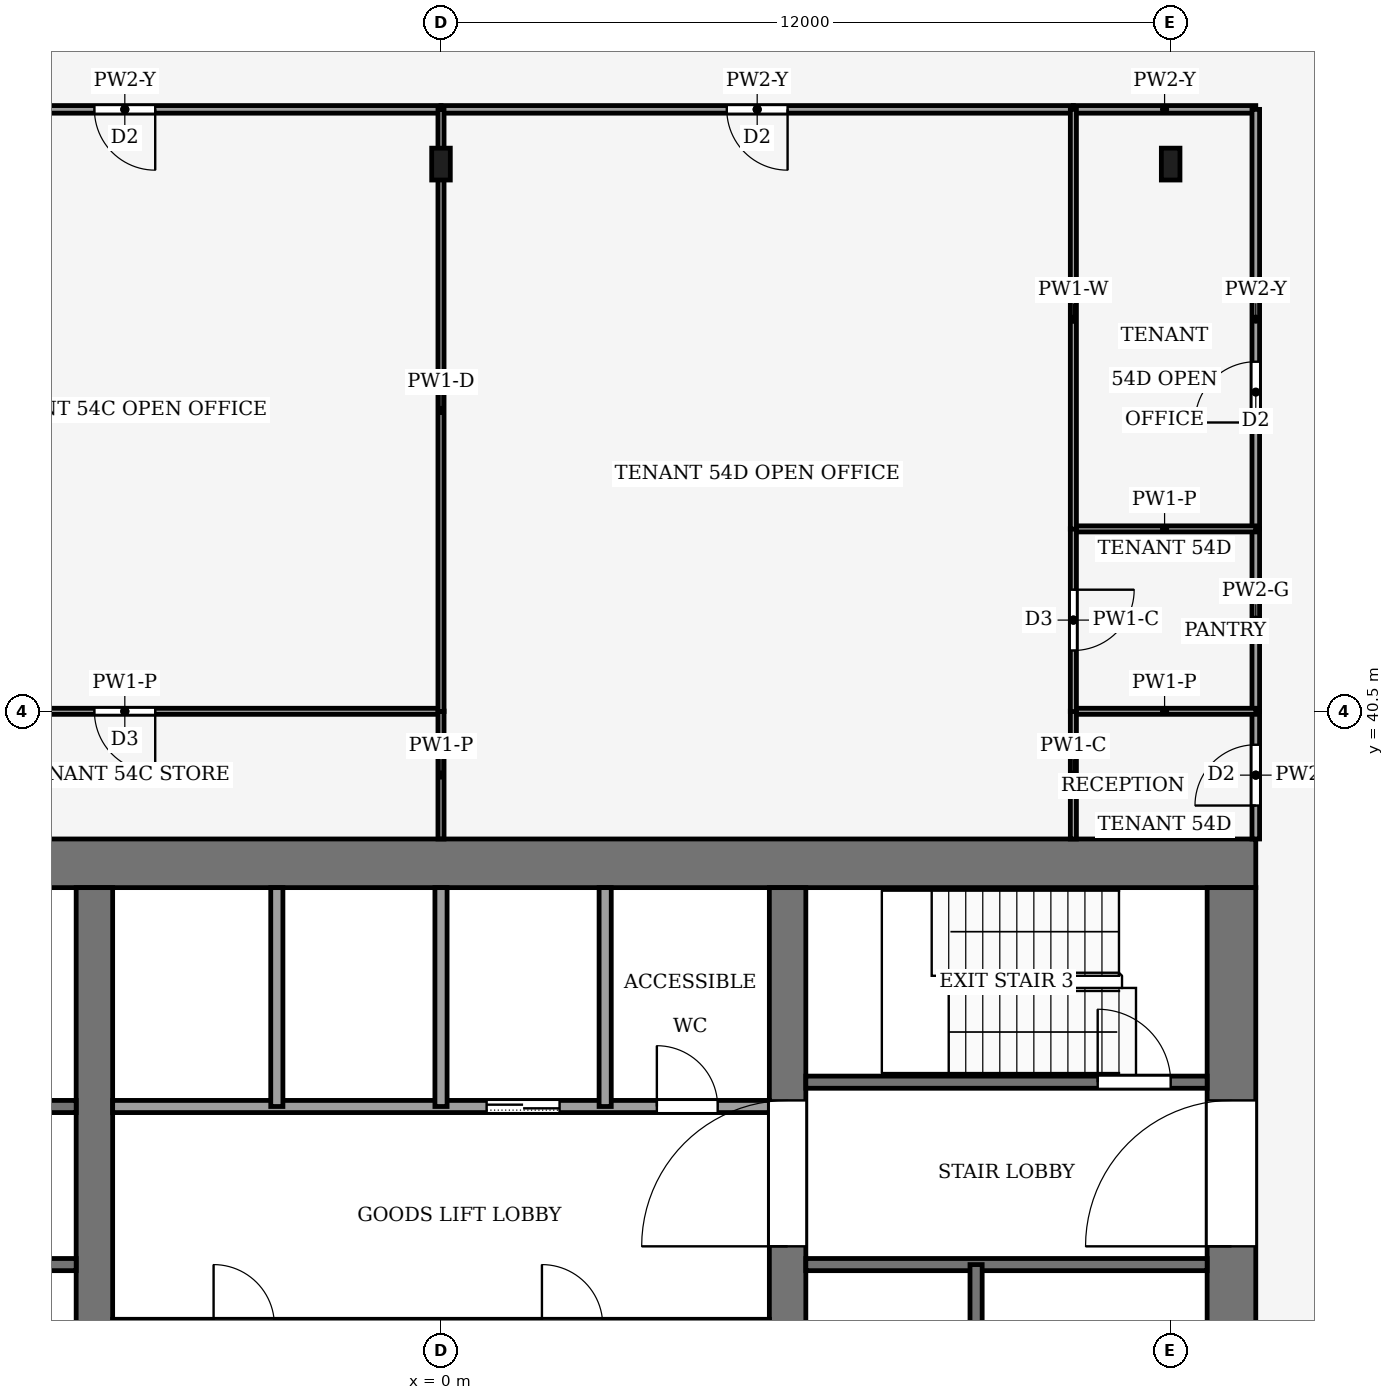
"""IFC4 building model, lengths in metres.
Left out: names, types, materials, properties, quantities, classifications, styles, units other than length and angle.
Written with IfcOpenShell. Run it as: python <this file> out.ifc"""

import sys

from ifc_helpers import new_model, si_unit, direction, frame, frame_2d, origin, origin_2d, place, context, subcontext, project, spatial, rectangle, i_section, extrude, element, fill, save


model = new_model("IFC4")
c1 = context("Model", 3, precision=1e-05, world=origin(), true_north=direction((0.0, 1.0)))
c2 = subcontext(c1, "Body", "Model", "MODEL_VIEW")
j1 = project(units=[si_unit("LENGTHUNIT", "METRE"), si_unit("PLANEANGLEUNIT", "RADIAN")], contexts=[c1])
p1 = place(None, origin())
s1 = spatial("IfcSite", under=j1, at=p1, CompositionType="ELEMENT")
p2 = place(p1, origin())
s2 = spatial("IfcBuilding", under=s1, at=p2, CompositionType="ELEMENT")
p3 = place(p2, frame((0.0, 0.0, 238.0)))
s3 = spatial("IfcBuildingStorey", under=s2, at=p3, CompositionType="ELEMENT", Elevation=238.0)
p4 = place(p3, frame((-13.4, 38.0, -0.13), z_axis=(0.0, 0.0, 1.0), x_axis=(1.0, 0.0, 0.0)))
e1 = element("IfcWall", 1, at=p4, inside=s3, PredefinedType="SHEAR", context=c2, shape_type="SweptSolid", body=[
    extrude(rectangle(XDim=26.8, YDim=0.8, at=frame_2d((13.4, 0.0))), origin(), (0.0, 0.0, 1.0), 4.0),
])
p5 = place(p3, frame((13.0, 18.4, -0.13), z_axis=(0.0, 0.0, 1.0), x_axis=(0.0, 1.0, 0.0)))
e2 = element("IfcWall", 2, at=p5, inside=s3, PredefinedType="SHEAR", context=c2, shape_type="SweptSolid", body=[
    extrude(rectangle(XDim=19.2, YDim=0.8, at=frame_2d((9.6, 0.0))), origin(), (0.0, 0.0, 1.0), 4.0),
])
p6 = place(p5, frame((2.8, 0.0, 0.13)))
e3 = element("IfcOpeningElement", 3, at=p6, cuts=e2, PredefinedType="OPENING", context=c2, shape_type="SweptSolid", body=[
    extrude(rectangle(XDim=2.4, YDim=2.4, at=frame_2d((1.2, 1.2))), frame((0.0, 0.41, 0.0), z_axis=(0.0, -1.0, 0.0), x_axis=(1.0, 0.0, 0.0)), (0.0, 0.0, 1.0), 0.82),
])
p7 = place(p5, frame((13.3, 0.0, 0.13)))
e4 = element("IfcOpeningElement", 4, at=p7, cuts=e2, PredefinedType="OPENING", context=c2, shape_type="SweptSolid", body=[
    extrude(rectangle(XDim=2.4, YDim=2.4, at=frame_2d((1.2, 1.2))), frame((0.0, 0.41, 0.0), z_axis=(0.0, -1.0, 0.0), x_axis=(1.0, 0.0, 0.0)), (0.0, 0.0, 1.0), 0.82),
])
p8 = place(p3, frame((-5.7, 18.4, -0.13), z_axis=(0.0, 0.0, 1.0), x_axis=(0.0, 1.0, 0.0)))
e5 = element("IfcWall", 5, at=p8, inside=s3, PredefinedType="SHEAR", context=c2, shape_type="SweptSolid", body=[
    extrude(rectangle(XDim=19.2, YDim=0.6, at=frame_2d((9.6, 0.0))), origin(), (0.0, 0.0, 1.0), 4.0),
])
p9 = place(p8, frame((8.35, 0.0, 0.13)))
e6 = element("IfcOpeningElement", 6, at=p9, cuts=e5, PredefinedType="OPENING", context=c2, shape_type="SweptSolid", body=[
    extrude(rectangle(XDim=0.9, YDim=2.1, at=frame_2d((0.45, 1.05))), frame((0.0, 0.31, 0.0), z_axis=(0.0, -1.0, 0.0), x_axis=(1.0, 0.0, 0.0)), (0.0, 0.0, 1.0), 0.62),
])
p10 = place(p3, frame((5.7, 18.4, -0.13), z_axis=(0.0, 0.0, 1.0), x_axis=(0.0, 1.0, 0.0)))
e7 = element("IfcWall", 7, at=p10, inside=s3, PredefinedType="SHEAR", context=c2, shape_type="SweptSolid", body=[
    extrude(rectangle(XDim=19.2, YDim=0.6, at=frame_2d((9.6, 0.0))), origin(), (0.0, 0.0, 1.0), 4.0),
])
p11 = place(p10, frame((13.3, 0.0, 0.13)))
e8 = element("IfcOpeningElement", 8, at=p11, cuts=e7, PredefinedType="OPENING", context=c2, shape_type="SweptSolid", body=[
    extrude(rectangle(XDim=2.4, YDim=2.4, at=frame_2d((1.2, 1.2))), frame((0.0, 0.31, 0.0), z_axis=(0.0, -1.0, 0.0), x_axis=(1.0, 0.0, 0.0)), (0.0, 0.0, 1.0), 0.62),
])
for number, where, z_axis, x_axis in (
    (9, (0.0, 49.5, 0.0), (0.0, 0.0, 1.0), (1.0, 0.0, 0.0)),
    (10, (12.0, 49.5, 0.0), (0.0, 0.0, 1.0), (1.0, 0.0, 0.0)),
):
    element("IfcColumn", number, at=place(p3, frame(where, z_axis=z_axis, x_axis=x_axis)), inside=s3, PredefinedType="COLUMN", context=c2, shape_type="SweptSolid", body=[
        extrude(i_section(OverallWidth=0.306, OverallDepth=0.524, WebThickness=0.012, FlangeThickness=0.04, FilletRadius=0.027, at=origin_2d()), origin(), (0.0, 0.0, 1.0), 4.0),
    ])
p12 = place(p3, frame((-12.6, 31.4, 0.0), z_axis=(0.0, 0.0, 1.0), x_axis=(1.0, 0.0, 0.0)))
e11 = element("IfcWall", 11, at=p12, inside=s3, PredefinedType="PARTITIONING", context=c2, shape_type="SweptSolid", body=[
    extrude(rectangle(XDim=6.6, YDim=0.2, at=frame_2d((3.3, 0.0))), origin(), (0.0, 0.0, 1.0), 3.87),
])
p13 = place(p12, frame((1.0, 0.0, 0.0)))
e12 = element("IfcOpeningElement", 12, at=p13, cuts=e11, PredefinedType="OPENING", context=c2, shape_type="SweptSolid", body=[
    extrude(rectangle(XDim=1.2, YDim=2.2, at=frame_2d((0.6, 1.1))), frame((0.0, 0.11, 0.0), z_axis=(0.0, -1.0, 0.0), x_axis=(1.0, 0.0, 0.0)), (0.0, 0.0, 1.0), 0.22),
])
p14 = place(p3, frame((6.0, 31.4, 0.0), z_axis=(0.0, 0.0, 1.0), x_axis=(1.0, 0.0, 0.0)))
e13 = element("IfcWall", 13, at=p14, inside=s3, PredefinedType="PARTITIONING", context=c2, shape_type="SweptSolid", body=[
    extrude(rectangle(XDim=6.6, YDim=0.2, at=frame_2d((3.3, 0.0))), origin(), (0.0, 0.0, 1.0), 3.87),
])
p15 = place(p3, frame((-12.6, 34.0, 0.0), z_axis=(0.0, 0.0, 1.0), x_axis=(1.0, 0.0, 0.0)))
e14 = element("IfcWall", 14, at=p15, inside=s3, PredefinedType="PARTITIONING", context=c2, shape_type="SweptSolid", body=[
    extrude(rectangle(XDim=6.6, YDim=0.2, at=frame_2d((3.3, 0.0))), origin(), (0.0, 0.0, 1.0), 3.87),
])
p16 = place(p15, frame((4.7, 0.0, 0.0)))
e15 = element("IfcOpeningElement", 15, at=p16, cuts=e14, PredefinedType="OPENING", context=c2, shape_type="SweptSolid", body=[
    extrude(rectangle(XDim=1.4, YDim=2.2, at=frame_2d((0.7, 1.1))), frame((0.0, 0.11, 0.0), z_axis=(0.0, -1.0, 0.0), x_axis=(1.0, 0.0, 0.0)), (0.0, 0.0, 1.0), 0.22),
])
p17 = place(p15, frame((2.3, 0.0, 0.0)))
e16 = element("IfcOpeningElement", 16, at=p17, cuts=e14, PredefinedType="OPENING", context=c2, shape_type="SweptSolid", body=[
    extrude(rectangle(XDim=1.4, YDim=2.2, at=frame_2d((0.7, 1.1))), frame((0.0, 0.11, 0.0), z_axis=(0.0, -1.0, 0.0), x_axis=(1.0, 0.0, 0.0)), (0.0, 0.0, 1.0), 0.22),
])
p18 = place(p15, frame((0.45, 0.0, 0.0)))
e17 = element("IfcOpeningElement", 17, at=p18, cuts=e14, PredefinedType="OPENING", context=c2, shape_type="SweptSolid", body=[
    extrude(rectangle(XDim=0.9, YDim=2.1, at=frame_2d((0.45, 1.05))), frame((0.0, 0.11, 0.0), z_axis=(0.0, -1.0, 0.0), x_axis=(1.0, 0.0, 0.0)), (0.0, 0.0, 1.0), 0.22),
])
p19 = place(p3, frame((-5.4, 34.0, 0.0), z_axis=(0.0, 0.0, 1.0), x_axis=(1.0, 0.0, 0.0)))
e18 = element("IfcWall", 18, at=p19, inside=s3, PredefinedType="PARTITIONING", context=c2, shape_type="SweptSolid", body=[
    extrude(rectangle(XDim=10.8, YDim=0.2, at=frame_2d((5.4, 0.0))), origin(), (0.0, 0.0, 1.0), 3.87),
])
p20 = place(p19, frame((6.15, 0.0, 0.0)))
e19 = element("IfcOpeningElement", 19, at=p20, cuts=e18, PredefinedType="OPENING", context=c2, shape_type="SweptSolid", body=[
    extrude(rectangle(XDim=1.2, YDim=2.2, at=frame_2d((0.6, 1.1))), frame((0.0, 0.11, 0.0), z_axis=(0.0, -1.0, 0.0), x_axis=(1.0, 0.0, 0.0)), (0.0, 0.0, 1.0), 0.22),
])
p21 = place(p19, frame((8.95, 0.0, 0.0)))
e20 = element("IfcOpeningElement", 20, at=p21, cuts=e18, PredefinedType="OPENING", context=c2, shape_type="SweptSolid", body=[
    extrude(rectangle(XDim=1.0, YDim=2.1, at=frame_2d((0.5, 1.05))), frame((0.0, 0.11, 0.0), z_axis=(0.0, -1.0, 0.0), x_axis=(1.0, 0.0, 0.0)), (0.0, 0.0, 1.0), 0.22),
])
p22 = place(p3, frame((6.0, 34.4, 0.0), z_axis=(0.0, 0.0, 1.0), x_axis=(1.0, 0.0, 0.0)))
e21 = element("IfcWall", 21, at=p22, inside=s3, PredefinedType="PARTITIONING", context=c2, shape_type="SweptSolid", body=[
    extrude(rectangle(XDim=6.6, YDim=0.2, at=frame_2d((3.3, 0.0))), origin(), (0.0, 0.0, 1.0), 3.87),
])
p23 = place(p22, frame((4.8, 0.0, 0.0)))
e22 = element("IfcOpeningElement", 22, at=p23, cuts=e21, PredefinedType="OPENING", context=c2, shape_type="SweptSolid", body=[
    extrude(rectangle(XDim=1.2, YDim=2.2, at=frame_2d((0.6, 1.1))), frame((0.0, 0.11, 0.0), z_axis=(0.0, -1.0, 0.0), x_axis=(1.0, 0.0, 0.0)), (0.0, 0.0, 1.0), 0.22),
])
for number, where, z_axis, x_axis in (
    (23, (-2.7, 34.0, 0.0), (0.0, 0.0, 1.0), (0.0, 1.0, 0.0)),
    (24, (0.0, 34.0, 0.0), (0.0, 0.0, 1.0), (0.0, 1.0, 0.0)),
    (25, (2.7, 34.0, 0.0), (0.0, 0.0, 1.0), (0.0, 1.0, 0.0)),
):
    element("IfcWall", number, at=place(p3, frame(where, z_axis=z_axis, x_axis=x_axis)), inside=s3, PredefinedType="PARTITIONING", context=c2, shape_type="SweptSolid", body=[
        extrude(rectangle(XDim=3.6, YDim=0.2, at=frame_2d((1.8, 0.0))), origin(), (0.0, 0.0, 1.0), 3.87),
    ])
p24 = place(p3, frame((8.8, 24.0, 0.0), z_axis=(0.0, 0.0, 1.0), x_axis=(0.0, 1.0, 0.0)))
e26 = element("IfcWall", 26, at=p24, inside=s3, PredefinedType="PARTITIONING", context=c2, shape_type="SweptSolid", body=[
    extrude(rectangle(XDim=7.4, YDim=0.2, at=frame_2d((3.7, 0.0))), origin(), (0.0, 0.0, 1.0), 3.87),
])
p25 = place(p3, frame((0.0, 50.4, 0.0), z_axis=(0.0, 0.0, 1.0), x_axis=(-1.0, 0.0, 0.0)))
e27 = element("IfcWall", 27, at=p25, inside=s3, PredefinedType="PARTITIONING", context=c2, shape_type="SweptSolid", body=[
    extrude(rectangle(XDim=10.4, YDim=0.125, at=frame_2d((5.2, 0.0))), origin(), (0.0, 0.0, 1.0), 3.24),
])
p26 = place(p25, frame((4.7, 0.0, 0.0)))
e28 = element("IfcOpeningElement", 28, at=p26, cuts=e27, PredefinedType="OPENING", context=c2, shape_type="SweptSolid", body=[
    extrude(rectangle(XDim=1.0, YDim=2.1, at=frame_2d((0.5, 1.05))), frame((0.0, 0.073, 0.0), z_axis=(0.0, -1.0, 0.0), x_axis=(1.0, 0.0, 0.0)), (0.0, 0.0, 1.0), 0.145),
])
p27 = place(p3, frame((13.4, 38.4, 0.0), z_axis=(0.0, 0.0, 1.0), x_axis=(0.0, 1.0, 0.0)))
e29 = element("IfcWall", 29, at=p27, inside=s3, PredefinedType="PARTITIONING", context=c2, shape_type="SweptSolid", body=[
    extrude(rectangle(XDim=2.1, YDim=0.125, at=frame_2d((1.05, 0.0))), origin(), (0.0, 0.0, 1.0), 3.14),
])
p28 = place(p27, frame((0.55, 0.0, 0.0)))
e30 = element("IfcOpeningElement", 30, at=p28, cuts=e29, PredefinedType="OPENING", context=c2, shape_type="SweptSolid", body=[
    extrude(rectangle(XDim=1.0, YDim=2.1, at=frame_2d((0.5, 1.05))), frame((0.0, 0.073, 0.0), z_axis=(0.0, -1.0, 0.0), x_axis=(1.0, 0.0, 0.0)), (0.0, 0.0, 1.0), 0.145),
])
p29 = place(p3, frame((13.4, 40.5, 0.0), z_axis=(0.0, 0.0, 1.0), x_axis=(0.0, 1.0, 0.0)))
e31 = element("IfcWall", 31, at=p29, inside=s3, PredefinedType="PARTITIONING", context=c2, shape_type="SweptSolid", body=[
    extrude(rectangle(XDim=3.0, YDim=0.125, at=frame_2d((1.5, 0.0))), origin(), (0.0, 0.0, 1.0), 3.87),
])
p30 = place(p3, frame((13.4, 50.4, 0.0), z_axis=(0.0, 0.0, 1.0), x_axis=(-1.0, 0.0, 0.0)))
e32 = element("IfcWall", 32, at=p30, inside=s3, PredefinedType="PARTITIONING", context=c2, shape_type="SweptSolid", body=[
    extrude(rectangle(XDim=3.0, YDim=0.125, at=frame_2d((1.5, 0.0))), origin(), (0.0, 0.0, 1.0), 3.24),
])
p31 = place(p3, frame((13.4, 43.5, 0.0), z_axis=(0.0, 0.0, 1.0), x_axis=(0.0, 1.0, 0.0)))
e33 = element("IfcWall", 33, at=p31, inside=s3, PredefinedType="PARTITIONING", context=c2, shape_type="SweptSolid", body=[
    extrude(rectangle(XDim=6.9, YDim=0.125, at=frame_2d((3.45, 0.0))), origin(), (0.0, 0.0, 1.0), 3.24),
])
p32 = place(p31, frame((1.75, 0.0, 0.0)))
e34 = element("IfcOpeningElement", 34, at=p32, cuts=e33, PredefinedType="OPENING", context=c2, shape_type="SweptSolid", body=[
    extrude(rectangle(XDim=1.0, YDim=2.1, at=frame_2d((0.5, 1.05))), frame((0.0, 0.073, 0.0), z_axis=(0.0, -1.0, 0.0), x_axis=(1.0, 0.0, 0.0)), (0.0, 0.0, 1.0), 0.145),
])
p33 = place(p3, frame((10.4, 50.4, 0.0), z_axis=(0.0, 0.0, 1.0), x_axis=(-1.0, 0.0, 0.0)))
e35 = element("IfcWall", 35, at=p33, inside=s3, PredefinedType="PARTITIONING", context=c2, shape_type="SweptSolid", body=[
    extrude(rectangle(XDim=10.4, YDim=0.125, at=frame_2d((5.2, 0.0))), origin(), (0.0, 0.0, 1.0), 3.24),
])
p34 = place(p33, frame((4.7, 0.0, 0.0)))
e36 = element("IfcOpeningElement", 36, at=p34, cuts=e35, PredefinedType="OPENING", context=c2, shape_type="SweptSolid", body=[
    extrude(rectangle(XDim=1.0, YDim=2.1, at=frame_2d((0.5, 1.05))), frame((0.0, 0.073, 0.0), z_axis=(0.0, -1.0, 0.0), x_axis=(1.0, 0.0, 0.0)), (0.0, 0.0, 1.0), 0.145),
])
p35 = place(p3, frame((0.0, 40.5, 0.0), z_axis=(0.0, 0.0, 1.0), x_axis=(-1.0, 0.0, 0.0)))
e37 = element("IfcWall", 37, at=p35, inside=s3, PredefinedType="PARTITIONING", context=c2, shape_type="SweptSolid", body=[
    extrude(rectangle(XDim=10.4, YDim=0.1, at=frame_2d((5.2, 0.0))), origin(), (0.0, 0.0, 1.0), 3.44),
])
p36 = place(p35, frame((4.7, 0.0, 0.0)))
e38 = element("IfcOpeningElement", 38, at=p36, cuts=e37, PredefinedType="OPENING", context=c2, shape_type="SweptSolid", body=[
    extrude(rectangle(XDim=1.0, YDim=2.1, at=frame_2d((0.5, 1.05))), frame((0.0, 0.06, 0.0), z_axis=(0.0, -1.0, 0.0), x_axis=(1.0, 0.0, 0.0)), (0.0, 0.0, 1.0), 0.12),
])
p37 = place(p3, frame((0.0, 38.4, 0.0), z_axis=(0.0, 0.0, 1.0), x_axis=(0.0, 1.0, 0.0)))
e39 = element("IfcWall", 39, at=p37, inside=s3, PredefinedType="PARTITIONING", context=c2, shape_type="SweptSolid", body=[
    extrude(rectangle(XDim=2.104, YDim=0.1, at=frame_2d((1.052, 0.0))), origin(), (0.0, 0.0, 1.0), 3.44),
])
p38 = place(p3, frame((0.0, 40.496, 0.0), z_axis=(0.0, 0.0, 1.0), x_axis=(0.0, 1.0, 0.0)))
e40 = element("IfcWall", 40, at=p38, inside=s3, PredefinedType="PARTITIONING", context=c2, shape_type="SweptSolid", body=[
    extrude(rectangle(XDim=9.904, YDim=0.1, at=frame_2d((4.952, 0.0))), origin(), (0.0, 0.0, 1.0), 3.29),
])
p39 = place(p3, frame((13.4, 40.5, 0.0), z_axis=(0.0, 0.0, 1.0), x_axis=(-1.0, 0.0, 0.0)))
e41 = element("IfcWall", 41, at=p39, inside=s3, PredefinedType="PARTITIONING", context=c2, shape_type="SweptSolid", body=[
    extrude(rectangle(XDim=3.0, YDim=0.1, at=frame_2d((1.5, 0.0))), origin(), (0.0, 0.0, 1.0), 3.44),
])
p40 = place(p3, frame((10.4, 40.504, 0.0), z_axis=(0.0, 0.0, 1.0), x_axis=(0.0, -1.0, 0.0)))
e42 = element("IfcWall", 42, at=p40, inside=s3, PredefinedType="PARTITIONING", context=c2, shape_type="SweptSolid", body=[
    extrude(rectangle(XDim=2.104, YDim=0.1, at=frame_2d((1.052, 0.0))), origin(), (0.0, 0.0, 1.0), 3.87),
])
p41 = place(p3, frame((13.4, 43.5, 0.0), z_axis=(0.0, 0.0, 1.0), x_axis=(-1.0, 0.0, 0.0)))
e43 = element("IfcWall", 43, at=p41, inside=s3, PredefinedType="PARTITIONING", context=c2, shape_type="SweptSolid", body=[
    extrude(rectangle(XDim=3.0, YDim=0.1, at=frame_2d((1.5, 0.0))), origin(), (0.0, 0.0, 1.0), 3.44),
])
p42 = place(p3, frame((10.4, 43.504, 0.0), z_axis=(0.0, 0.0, 1.0), x_axis=(0.0, -1.0, 0.0)))
e44 = element("IfcWall", 44, at=p42, inside=s3, PredefinedType="PARTITIONING", context=c2, shape_type="SweptSolid", body=[
    extrude(rectangle(XDim=3.008, YDim=0.1, at=frame_2d((1.504, 0.0))), origin(), (0.0, 0.0, 1.0), 3.87),
])
p43 = place(p42, frame((1.004, 0.0, 0.0)))
e45 = element("IfcOpeningElement", 45, at=p43, cuts=e44, PredefinedType="OPENING", context=c2, shape_type="SweptSolid", body=[
    extrude(rectangle(XDim=1.0, YDim=2.1, at=frame_2d((0.5, 1.05))), frame((0.0, 0.06, 0.0), z_axis=(0.0, -1.0, 0.0), x_axis=(1.0, 0.0, 0.0)), (0.0, 0.0, 1.0), 0.12),
])
p44 = place(p3, frame((10.4, 50.4, 0.0), z_axis=(0.0, 0.0, 1.0), x_axis=(0.0, -1.0, 0.0)))
e46 = element("IfcWall", 46, at=p44, inside=s3, PredefinedType="PARTITIONING", context=c2, shape_type="SweptSolid", body=[
    extrude(rectangle(XDim=6.904, YDim=0.1, at=frame_2d((3.452, 0.0))), origin(), (0.0, 0.0, 1.0), 3.24),
])
p45 = place(p20, origin())
e47 = element("IfcDoor", 47, at=p45, inside=s3, OperationType="SLIDING_TO_LEFT", PredefinedType="DOOR", context=c2, shape_type="SweptSolid", body=[
    extrude(rectangle(XDim=1.2, YDim=2.2, at=frame_2d((0.6, 1.1))), frame((0.0, 0.025, 0.0), z_axis=(0.0, -1.0, 0.0), x_axis=(1.0, 0.0, 0.0)), (0.0, 0.0, 1.0), 0.05),
])
fill(e19, e47)
p46 = place(p21, origin())
e48 = element("IfcDoor", 48, at=p46, inside=s3, OperationType="SINGLE_SWING_LEFT", PredefinedType="DOOR", context=c2, shape_type="SweptSolid", body=[
    extrude(rectangle(XDim=1.0, YDim=2.1, at=frame_2d((0.5, 1.05))), frame((0.0, 0.025, 0.0), z_axis=(0.0, -1.0, 0.0), x_axis=(1.0, 0.0, 0.0)), (0.0, 0.0, 1.0), 0.05),
])
fill(e20, e48)
p47 = place(p23, origin())
e49 = element("IfcDoor", 49, at=p47, inside=s3, OperationType="SINGLE_SWING_RIGHT", PredefinedType="DOOR", context=c2, shape_type="SweptSolid", body=[
    extrude(rectangle(XDim=1.2, YDim=2.2, at=frame_2d((0.6, 1.1))), frame((0.0, 0.025, 0.0), z_axis=(0.0, -1.0, 0.0), x_axis=(1.0, 0.0, 0.0)), (0.0, 0.0, 1.0), 0.05),
])
fill(e22, e49)
p48 = place(p11, origin())
e50 = element("IfcDoor", 50, at=p48, inside=s3, OperationType="DOUBLE_DOOR_SINGLE_SWING", PredefinedType="DOOR", context=c2, shape_type="SweptSolid", body=[
    extrude(rectangle(XDim=2.4, YDim=2.4, at=frame_2d((1.2, 1.2))), frame((0.0, 0.025, 0.0), z_axis=(0.0, -1.0, 0.0), x_axis=(1.0, 0.0, 0.0)), (0.0, 0.0, 1.0), 0.05),
])
fill(e8, e50)
p49 = place(p7, origin())
e51 = element("IfcDoor", 51, at=p49, inside=s3, OperationType="DOUBLE_DOOR_SINGLE_SWING", PredefinedType="DOOR", context=c2, shape_type="SweptSolid", body=[
    extrude(rectangle(XDim=2.4, YDim=2.4, at=frame_2d((1.2, 1.2))), frame((0.0, 0.025, 0.0), z_axis=(0.0, -1.0, 0.0), x_axis=(1.0, 0.0, 0.0)), (0.0, 0.0, 1.0), 0.05),
])
fill(e4, e51)
p50 = place(p26, origin())
e52 = element("IfcDoor", 52, at=p50, inside=s3, OperationType="SINGLE_SWING_LEFT", PredefinedType="DOOR", context=c2, shape_type="SweptSolid", body=[
    extrude(rectangle(XDim=1.0, YDim=2.1, at=frame_2d((0.5, 1.05))), frame((0.0, 0.025, 0.0), z_axis=(0.0, -1.0, 0.0), x_axis=(1.0, 0.0, 0.0)), (0.0, 0.0, 1.0), 0.05),
])
fill(e28, e52)
p51 = place(p28, origin())
e53 = element("IfcDoor", 53, at=p51, inside=s3, OperationType="SINGLE_SWING_RIGHT", PredefinedType="DOOR", context=c2, shape_type="SweptSolid", body=[
    extrude(rectangle(XDim=1.0, YDim=2.1, at=frame_2d((0.5, 1.05))), frame((0.0, 0.025, 0.0), z_axis=(0.0, -1.0, 0.0), x_axis=(1.0, 0.0, 0.0)), (0.0, 0.0, 1.0), 0.05),
])
fill(e30, e53)
p52 = place(p32, origin())
e54 = element("IfcDoor", 54, at=p52, inside=s3, OperationType="SINGLE_SWING_LEFT", PredefinedType="DOOR", context=c2, shape_type="SweptSolid", body=[
    extrude(rectangle(XDim=1.0, YDim=2.1, at=frame_2d((0.5, 1.05))), frame((0.0, 0.025, 0.0), z_axis=(0.0, -1.0, 0.0), x_axis=(1.0, 0.0, 0.0)), (0.0, 0.0, 1.0), 0.05),
])
fill(e34, e54)
p53 = place(p34, origin())
e55 = element("IfcDoor", 55, at=p53, inside=s3, OperationType="SINGLE_SWING_RIGHT", PredefinedType="DOOR", context=c2, shape_type="SweptSolid", body=[
    extrude(rectangle(XDim=1.0, YDim=2.1, at=frame_2d((0.5, 1.05))), frame((0.0, 0.025, 0.0), z_axis=(0.0, -1.0, 0.0), x_axis=(1.0, 0.0, 0.0)), (0.0, 0.0, 1.0), 0.05),
])
fill(e36, e55)
p54 = place(p36, origin())
e56 = element("IfcDoor", 56, at=p54, inside=s3, OperationType="SINGLE_SWING_RIGHT", PredefinedType="DOOR", context=c2, shape_type="SweptSolid", body=[
    extrude(rectangle(XDim=1.0, YDim=2.1, at=frame_2d((0.5, 1.05))), frame((0.0, 0.025, 0.0), z_axis=(0.0, -1.0, 0.0), x_axis=(1.0, 0.0, 0.0)), (0.0, 0.0, 1.0), 0.05),
])
fill(e38, e56)
p55 = place(p43, origin())
e57 = element("IfcDoor", 57, at=p55, inside=s3, OperationType="SINGLE_SWING_LEFT", PredefinedType="DOOR", context=c2, shape_type="SweptSolid", body=[
    extrude(rectangle(XDim=1.0, YDim=2.1, at=frame_2d((0.5, 1.05))), frame((0.0, 0.025, 0.0), z_axis=(0.0, -1.0, 0.0), x_axis=(1.0, 0.0, 0.0)), (0.0, 0.0, 1.0), 0.05),
])
fill(e45, e57)
save(model, sys.argv[1])
